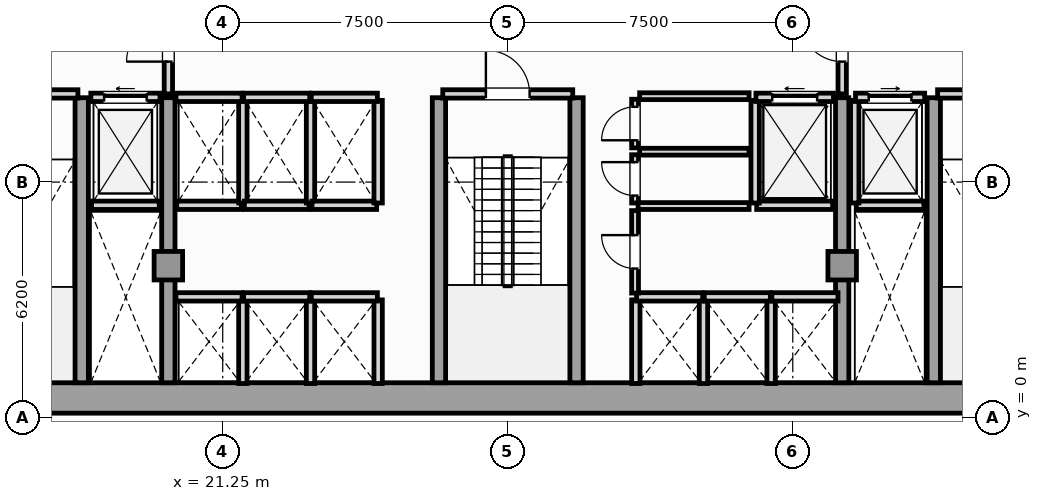
"""IFC4 building model, lengths in metres.
Left out: names, types, materials, properties, quantities, classifications, styles, units other than length and angle.
Written with IfcOpenShell. Run it as: python <this file> out.ifc"""

import sys

from ifc_helpers import new_model, si_unit, direction, frame, frame_2d, origin, origin_2d, place, context, subcontext, project, spatial, rectangle, extrude, element, fill, save


model = new_model("IFC4")
c1 = context("Model", 3, precision=1e-05, world=origin(), true_north=direction((0.0, 1.0)))
c2 = subcontext(c1, "Body", "Model", "MODEL_VIEW")
j1 = project(units=[si_unit("LENGTHUNIT", "METRE"), si_unit("PLANEANGLEUNIT", "RADIAN")], contexts=[c1])
p1 = place(None, origin())
s1 = spatial("IfcSite", under=j1, at=p1, CompositionType="ELEMENT")
p2 = place(p1, origin())
s2 = spatial("IfcBuilding", under=s1, at=p2, CompositionType="ELEMENT")
p3 = place(p2, frame((0.0, 0.0, 15.0)))
s3 = spatial("IfcBuildingStorey", under=s2, at=p3, CompositionType="ELEMENT", Elevation=15.0)
p4 = place(p3, frame((13.25, 0.52, 0.0), z_axis=(0.0, 0.0, 1.0), x_axis=(1.0, 0.0, 0.0)))
e1 = element("IfcWall", 1, at=p4, inside=s3, PredefinedType="SHEAR", context=c2, shape_type="SweptSolid", body=[
    extrude(rectangle(XDim=31.0, YDim=0.8, at=frame_2d((15.5, 0.0))), origin(), (0.0, 0.0, 1.0), 4.5),
])
for number, where, z_axis, x_axis in (
    (2, (17.54, 0.92, 0.0), (0.0, 0.0, 1.0), (0.0, 1.0, 0.0)),
    (3, (19.82, 0.92, 0.0), (0.0, 0.0, 1.0), (0.0, 1.0, 0.0)),
    (4, (26.94, 0.92, 0.0), (0.0, 0.0, 1.0), (0.0, 1.0, 0.0)),
    (5, (30.56, 0.92, 0.0), (0.0, 0.0, 1.0), (0.0, 1.0, 0.0)),
    (6, (37.55, 0.92, 0.0), (0.0, 0.0, 1.0), (0.0, 1.0, 0.0)),
    (7, (39.96, 0.92, 0.0), (0.0, 0.0, 1.0), (0.0, 1.0, 0.0)),
):
    element("IfcWall", number, at=place(p3, frame(where, z_axis=z_axis, x_axis=x_axis)), inside=s3, PredefinedType="SHEAR", context=c2, shape_type="SweptSolid", body=[
        extrude(rectangle(XDim=7.5, YDim=0.35, at=frame_2d((3.75, 0.0))), origin(), (0.0, 0.0, 1.0), 4.5),
    ])
for number, where, z_axis, x_axis in (
    (8, (19.82, 4.0, 0.0), (0.0, 0.0, 1.0), (1.0, 0.0, 0.0)),
    (9, (37.55, 4.0, 0.0), (0.0, 0.0, 1.0), (1.0, 0.0, 0.0)),
):
    element("IfcColumn", number, at=place(p3, frame(where, z_axis=z_axis, x_axis=x_axis)), inside=s3, PredefinedType="COLUMN", context=c2, shape_type="SweptSolid", body=[
        extrude(rectangle(XDim=0.75, YDim=0.75, at=origin_2d()), origin(), (0.0, 0.0, 1.0), 4.8),
    ])
p5 = place(p3, frame((17.8, 5.59, 0.0), z_axis=(0.0, 0.0, 1.0), x_axis=(1.0, 0.0, 0.0)))
e10 = element("IfcWall", 10, at=p5, inside=s3, PredefinedType="SOLIDWALL", context=c2, shape_type="SweptSolid", body=[
    extrude(rectangle(XDim=1.78, YDim=0.22, at=frame_2d((0.89, 0.0))), origin(), (0.0, 0.0, 1.0), 4.5),
])
p6 = place(p3, frame((17.78, 8.43, 0.0), z_axis=(0.0, 0.0, 1.0), x_axis=(1.0, 0.0, 0.0)))
e11 = element("IfcWall", 11, at=p6, inside=s3, PredefinedType="SOLIDWALL", context=c2, shape_type="SweptSolid", body=[
    extrude(rectangle(XDim=1.82, YDim=0.22, at=frame_2d((0.91, 0.0))), origin(), (0.0, 0.0, 1.0), 4.5),
])
p7 = place(p6, frame((0.35, 0.0, 0.0)))
e12 = element("IfcOpeningElement", 12, at=p7, cuts=e11, PredefinedType="OPENING", context=c2, shape_type="SweptSolid", body=[
    extrude(rectangle(XDim=1.12, YDim=2.25, at=frame_2d((0.56, 1.125))), frame((0.0, 0.12, 0.0), z_axis=(0.0, -1.0, 0.0), x_axis=(1.0, 0.0, 0.0)), (0.0, 0.0, 1.0), 0.24),
])
p8 = place(p3, frame((37.92, 5.59, 0.0), z_axis=(0.0, 0.0, 1.0), x_axis=(1.0, 0.0, 0.0)))
e13 = element("IfcWall", 13, at=p8, inside=s3, PredefinedType="SOLIDWALL", context=c2, shape_type="SweptSolid", body=[
    extrude(rectangle(XDim=1.78, YDim=0.22, at=frame_2d((0.89, 0.0))), origin(), (0.0, 0.0, 1.0), 4.5),
])
p9 = place(p3, frame((37.88, 5.65, 0.0), z_axis=(0.0, 0.0, 1.0), x_axis=(0.0, 1.0, 0.0)))
e14 = element("IfcWall", 14, at=p9, inside=s3, PredefinedType="SOLIDWALL", context=c2, shape_type="SweptSolid", body=[
    extrude(rectangle(XDim=2.7, YDim=0.22, at=frame_2d((1.35, 0.0))), origin(), (0.0, 0.0, 1.0), 4.5),
])
p10 = place(p3, frame((37.9, 8.43, 0.0), z_axis=(0.0, 0.0, 1.0), x_axis=(1.0, 0.0, 0.0)))
e15 = element("IfcWall", 15, at=p10, inside=s3, PredefinedType="SOLIDWALL", context=c2, shape_type="SweptSolid", body=[
    extrude(rectangle(XDim=1.82, YDim=0.22, at=frame_2d((0.91, 0.0))), origin(), (0.0, 0.0, 1.0), 4.5),
])
p11 = place(p10, frame((0.35, 0.0, 0.0)))
e16 = element("IfcOpeningElement", 16, at=p11, cuts=e15, PredefinedType="OPENING", context=c2, shape_type="SweptSolid", body=[
    extrude(rectangle(XDim=1.12, YDim=2.25, at=frame_2d((0.56, 1.125))), frame((0.0, 0.12, 0.0), z_axis=(0.0, -1.0, 0.0), x_axis=(1.0, 0.0, 0.0)), (0.0, 0.0, 1.0), 0.24),
])
p12 = place(p3, frame((35.3, 5.59, 0.0), z_axis=(0.0, 0.0, 1.0), x_axis=(1.0, 0.0, 0.0)))
e17 = element("IfcWall", 17, at=p12, inside=s3, PredefinedType="SOLIDWALL", context=c2, shape_type="SweptSolid", body=[
    extrude(rectangle(XDim=2.0, YDim=0.22, at=frame_2d((1.0, 0.0))), origin(), (0.0, 0.0, 1.0), 4.5),
])
p13 = place(p3, frame((35.26, 5.65, 0.0), z_axis=(0.0, 0.0, 1.0), x_axis=(0.0, 1.0, 0.0)))
e18 = element("IfcWall", 18, at=p13, inside=s3, PredefinedType="SOLIDWALL", context=c2, shape_type="SweptSolid", body=[
    extrude(rectangle(XDim=2.7, YDim=0.22, at=frame_2d((1.35, 0.0))), origin(), (0.0, 0.0, 1.0), 4.5),
])
p14 = place(p3, frame((35.28, 8.43, 0.0), z_axis=(0.0, 0.0, 1.0), x_axis=(1.0, 0.0, 0.0)))
e19 = element("IfcWall", 19, at=p14, inside=s3, PredefinedType="SOLIDWALL", context=c2, shape_type="SweptSolid", body=[
    extrude(rectangle(XDim=2.04, YDim=0.22, at=frame_2d((1.02, 0.0))), origin(), (0.0, 0.0, 1.0), 4.5),
])
p15 = place(p14, frame((0.43, 0.0, 0.0)))
e20 = element("IfcOpeningElement", 20, at=p15, cuts=e19, PredefinedType="OPENING", context=c2, shape_type="SweptSolid", body=[
    extrude(rectangle(XDim=1.18, YDim=2.2, at=frame_2d((0.59, 1.1))), frame((0.0, 0.12, 0.0), z_axis=(0.0, -1.0, 0.0), x_axis=(1.0, 0.0, 0.0)), (0.0, 0.0, 1.0), 0.24),
])
p16 = place(p3, frame((21.78, 0.9, 0.0), z_axis=(0.0, 0.0, 1.0), x_axis=(0.0, 1.0, 0.0)))
e21 = element("IfcWall", 21, at=p16, inside=s3, PredefinedType="SOLIDWALL", context=c2, shape_type="SweptSolid", body=[
    extrude(rectangle(XDim=2.2, YDim=0.22, at=frame_2d((1.1, 0.0))), origin(), (0.0, 0.0, 1.0), 4.5),
])
p17 = place(p3, frame((20.02, 3.18, 0.0), z_axis=(0.0, 0.0, 1.0), x_axis=(1.0, 0.0, 0.0)))
e22 = element("IfcWall", 22, at=p17, inside=s3, PredefinedType="SOLIDWALL", context=c2, shape_type="SweptSolid", body=[
    extrude(rectangle(XDim=1.74, YDim=0.22, at=frame_2d((0.87, 0.0))), origin(), (0.0, 0.0, 1.0), 4.5),
])
p18 = place(p3, frame((23.56, 0.9, 0.0), z_axis=(0.0, 0.0, 1.0), x_axis=(0.0, 1.0, 0.0)))
e23 = element("IfcWall", 23, at=p18, inside=s3, PredefinedType="SOLIDWALL", context=c2, shape_type="SweptSolid", body=[
    extrude(rectangle(XDim=2.2, YDim=0.22, at=frame_2d((1.1, 0.0))), origin(), (0.0, 0.0, 1.0), 4.5),
])
p19 = place(p3, frame((21.8, 3.18, 0.0), z_axis=(0.0, 0.0, 1.0), x_axis=(1.0, 0.0, 0.0)))
e24 = element("IfcWall", 24, at=p19, inside=s3, PredefinedType="SOLIDWALL", context=c2, shape_type="SweptSolid", body=[
    extrude(rectangle(XDim=1.74, YDim=0.22, at=frame_2d((0.87, 0.0))), origin(), (0.0, 0.0, 1.0), 4.5),
])
p20 = place(p3, frame((25.34, 0.9, 0.0), z_axis=(0.0, 0.0, 1.0), x_axis=(0.0, 1.0, 0.0)))
e25 = element("IfcWall", 25, at=p20, inside=s3, PredefinedType="SOLIDWALL", context=c2, shape_type="SweptSolid", body=[
    extrude(rectangle(XDim=2.2, YDim=0.22, at=frame_2d((1.1, 0.0))), origin(), (0.0, 0.0, 1.0), 4.5),
])
p21 = place(p3, frame((23.58, 3.18, 0.0), z_axis=(0.0, 0.0, 1.0), x_axis=(1.0, 0.0, 0.0)))
e26 = element("IfcWall", 26, at=p21, inside=s3, PredefinedType="SOLIDWALL", context=c2, shape_type="SweptSolid", body=[
    extrude(rectangle(XDim=1.74, YDim=0.22, at=frame_2d((0.87, 0.0))), origin(), (0.0, 0.0, 1.0), 4.5),
])
for number, where, z_axis, x_axis in (
    (27, (32.12, 0.9, 0.0), (0.0, 0.0, 1.0), (0.0, 1.0, 0.0)),
    (28, (33.9, 0.9, 0.0), (0.0, 0.0, 1.0), (0.0, 1.0, 0.0)),
):
    element("IfcWall", number, at=place(p3, frame(where, z_axis=z_axis, x_axis=x_axis)), inside=s3, PredefinedType="SOLIDWALL", context=c2, shape_type="SweptSolid", body=[
        extrude(rectangle(XDim=2.2, YDim=0.22, at=frame_2d((1.1, 0.0))), origin(), (0.0, 0.0, 1.0), 4.5),
    ])
p22 = place(p3, frame((32.14, 3.18, 0.0), z_axis=(0.0, 0.0, 1.0), x_axis=(1.0, 0.0, 0.0)))
e29 = element("IfcWall", 29, at=p22, inside=s3, PredefinedType="SOLIDWALL", context=c2, shape_type="SweptSolid", body=[
    extrude(rectangle(XDim=1.74, YDim=0.22, at=frame_2d((0.87, 0.0))), origin(), (0.0, 0.0, 1.0), 4.5),
])
p23 = place(p3, frame((35.68, 0.9, 0.0), z_axis=(0.0, 0.0, 1.0), x_axis=(0.0, 1.0, 0.0)))
e30 = element("IfcWall", 30, at=p23, inside=s3, PredefinedType="SOLIDWALL", context=c2, shape_type="SweptSolid", body=[
    extrude(rectangle(XDim=2.2, YDim=0.22, at=frame_2d((1.1, 0.0))), origin(), (0.0, 0.0, 1.0), 4.5),
])
for number, where, z_axis, x_axis in (
    (31, (33.92, 3.18, 0.0), (0.0, 0.0, 1.0), (1.0, 0.0, 0.0)),
    (32, (35.7, 3.18, 0.0), (0.0, 0.0, 1.0), (1.0, 0.0, 0.0)),
):
    element("IfcWall", number, at=place(p3, frame(where, z_axis=z_axis, x_axis=x_axis)), inside=s3, PredefinedType="SOLIDWALL", context=c2, shape_type="SweptSolid", body=[
        extrude(rectangle(XDim=1.74, YDim=0.22, at=frame_2d((0.87, 0.0))), origin(), (0.0, 0.0, 1.0), 4.5),
    ])
p24 = place(p3, frame((20.04, 5.59, 0.0), z_axis=(0.0, 0.0, 1.0), x_axis=(1.0, 0.0, 0.0)))
e33 = element("IfcWall", 33, at=p24, inside=s3, PredefinedType="SOLIDWALL", context=c2, shape_type="SweptSolid", body=[
    extrude(rectangle(XDim=1.7, YDim=0.22, at=frame_2d((0.85, 0.0))), origin(), (0.0, 0.0, 1.0), 4.5),
])
p25 = place(p3, frame((21.78, 5.65, 0.0), z_axis=(0.0, 0.0, 1.0), x_axis=(0.0, 1.0, 0.0)))
e34 = element("IfcWall", 34, at=p25, inside=s3, PredefinedType="SOLIDWALL", context=c2, shape_type="SweptSolid", body=[
    extrude(rectangle(XDim=2.7, YDim=0.22, at=frame_2d((1.35, 0.0))), origin(), (0.0, 0.0, 1.0), 4.5),
])
p26 = place(p3, frame((20.02, 8.43, 0.0), z_axis=(0.0, 0.0, 1.0), x_axis=(1.0, 0.0, 0.0)))
e35 = element("IfcWall", 35, at=p26, inside=s3, PredefinedType="SOLIDWALL", context=c2, shape_type="SweptSolid", body=[
    extrude(rectangle(XDim=1.74, YDim=0.22, at=frame_2d((0.87, 0.0))), origin(), (0.0, 0.0, 1.0), 4.5),
])
p27 = place(p3, frame((21.82, 5.59, 0.0), z_axis=(0.0, 0.0, 1.0), x_axis=(1.0, 0.0, 0.0)))
e36 = element("IfcWall", 36, at=p27, inside=s3, PredefinedType="SOLIDWALL", context=c2, shape_type="SweptSolid", body=[
    extrude(rectangle(XDim=1.7, YDim=0.22, at=frame_2d((0.85, 0.0))), origin(), (0.0, 0.0, 1.0), 4.5),
])
p28 = place(p3, frame((23.56, 5.65, 0.0), z_axis=(0.0, 0.0, 1.0), x_axis=(0.0, 1.0, 0.0)))
e37 = element("IfcWall", 37, at=p28, inside=s3, PredefinedType="SOLIDWALL", context=c2, shape_type="SweptSolid", body=[
    extrude(rectangle(XDim=2.7, YDim=0.22, at=frame_2d((1.35, 0.0))), origin(), (0.0, 0.0, 1.0), 4.5),
])
p29 = place(p3, frame((21.8, 8.43, 0.0), z_axis=(0.0, 0.0, 1.0), x_axis=(1.0, 0.0, 0.0)))
e38 = element("IfcWall", 38, at=p29, inside=s3, PredefinedType="SOLIDWALL", context=c2, shape_type="SweptSolid", body=[
    extrude(rectangle(XDim=1.74, YDim=0.22, at=frame_2d((0.87, 0.0))), origin(), (0.0, 0.0, 1.0), 4.5),
])
p30 = place(p3, frame((23.6, 5.59, 0.0), z_axis=(0.0, 0.0, 1.0), x_axis=(1.0, 0.0, 0.0)))
e39 = element("IfcWall", 39, at=p30, inside=s3, PredefinedType="SOLIDWALL", context=c2, shape_type="SweptSolid", body=[
    extrude(rectangle(XDim=1.7, YDim=0.22, at=frame_2d((0.85, 0.0))), origin(), (0.0, 0.0, 1.0), 4.5),
])
p31 = place(p3, frame((25.34, 5.65, 0.0), z_axis=(0.0, 0.0, 1.0), x_axis=(0.0, 1.0, 0.0)))
e40 = element("IfcWall", 40, at=p31, inside=s3, PredefinedType="SOLIDWALL", context=c2, shape_type="SweptSolid", body=[
    extrude(rectangle(XDim=2.7, YDim=0.22, at=frame_2d((1.35, 0.0))), origin(), (0.0, 0.0, 1.0), 4.5),
])
p32 = place(p3, frame((23.58, 8.43, 0.0), z_axis=(0.0, 0.0, 1.0), x_axis=(1.0, 0.0, 0.0)))
e41 = element("IfcWall", 41, at=p32, inside=s3, PredefinedType="SOLIDWALL", context=c2, shape_type="SweptSolid", body=[
    extrude(rectangle(XDim=1.74, YDim=0.22, at=frame_2d((0.87, 0.0))), origin(), (0.0, 0.0, 1.0), 4.5),
])
p33 = place(p3, frame((14.04, 8.52, 0.0), z_axis=(0.0, 0.0, 1.0), x_axis=(1.0, 0.0, 0.0)))
e42 = element("IfcWall", 42, at=p33, inside=s3, PredefinedType="SOLIDWALL", context=c2, shape_type="SweptSolid", body=[
    extrude(rectangle(XDim=3.4, YDim=0.22, at=frame_2d((1.7, 0.0))), origin(), (0.0, 0.0, 1.0), 4.5),
])
p34 = place(p33, frame((1.125, 0.0, 0.0)))
e43 = element("IfcOpeningElement", 43, at=p34, cuts=e42, PredefinedType="OPENING", context=c2, shape_type="SweptSolid", body=[
    extrude(rectangle(XDim=1.15, YDim=2.2, at=frame_2d((0.575, 1.1))), frame((0.0, 0.12, 0.0), z_axis=(0.0, -1.0, 0.0), x_axis=(1.0, 0.0, 0.0)), (0.0, 0.0, 1.0), 0.24),
])
p35 = place(p3, frame((40.06, 8.52, 0.0), z_axis=(0.0, 0.0, 1.0), x_axis=(1.0, 0.0, 0.0)))
e44 = element("IfcWall", 44, at=p35, inside=s3, PredefinedType="SOLIDWALL", context=c2, shape_type="SweptSolid", body=[
    extrude(rectangle(XDim=3.4, YDim=0.22, at=frame_2d((1.7, 0.0))), origin(), (0.0, 0.0, 1.0), 4.5),
])
p36 = place(p35, frame((1.125, 0.0, 0.0)))
e45 = element("IfcOpeningElement", 45, at=p36, cuts=e44, PredefinedType="OPENING", context=c2, shape_type="SweptSolid", body=[
    extrude(rectangle(XDim=1.15, YDim=2.2, at=frame_2d((0.575, 1.1))), frame((0.0, 0.12, 0.0), z_axis=(0.0, -1.0, 0.0), x_axis=(1.0, 0.0, 0.0)), (0.0, 0.0, 1.0), 0.24),
])
p37 = place(p3, frame((27.04, 8.52, 0.0), z_axis=(0.0, 0.0, 1.0), x_axis=(1.0, 0.0, 0.0)))
e46 = element("IfcWall", 46, at=p37, inside=s3, PredefinedType="SOLIDWALL", context=c2, shape_type="SweptSolid", body=[
    extrude(rectangle(XDim=3.42, YDim=0.22, at=frame_2d((1.71, 0.0))), origin(), (0.0, 0.0, 1.0), 4.5),
])
p38 = place(p37, frame((1.135, 0.0, 0.0)))
e47 = element("IfcOpeningElement", 47, at=p38, cuts=e46, PredefinedType="OPENING", context=c2, shape_type="SweptSolid", body=[
    extrude(rectangle(XDim=1.15, YDim=2.2, at=frame_2d((0.575, 1.1))), frame((0.0, 0.12, 0.0), z_axis=(0.0, -1.0, 0.0), x_axis=(1.0, 0.0, 0.0)), (0.0, 0.0, 1.0), 0.24),
])
p39 = place(p3, frame((19.82, 8.52, 0.0), z_axis=(0.0, 0.0, 1.0), x_axis=(0.0, 1.0, 0.0)))
e48 = element("IfcWall", 48, at=p39, inside=s3, PredefinedType="SOLIDWALL", context=c2, shape_type="SweptSolid", body=[
    extrude(rectangle(XDim=2.8, YDim=0.22, at=frame_2d((1.4, 0.0))), origin(), (0.0, 0.0, 1.0), 3.956),
])
p40 = place(p39, frame((0.85, 0.0, 0.0)))
e49 = element("IfcOpeningElement", 49, at=p40, cuts=e48, PredefinedType="OPENING", context=c2, shape_type="SweptSolid", body=[
    extrude(rectangle(XDim=1.1, YDim=2.2, at=frame_2d((0.55, 1.1))), frame((0.0, 0.12, 0.0), z_axis=(0.0, -1.0, 0.0), x_axis=(1.0, 0.0, 0.0)), (0.0, 0.0, 1.0), 0.24),
])
p41 = place(p3, frame((37.55, 8.52, 0.0), z_axis=(0.0, 0.0, 1.0), x_axis=(0.0, 1.0, 0.0)))
e50 = element("IfcWall", 50, at=p41, inside=s3, PredefinedType="SOLIDWALL", context=c2, shape_type="SweptSolid", body=[
    extrude(rectangle(XDim=2.8, YDim=0.22, at=frame_2d((1.4, 0.0))), origin(), (0.0, 0.0, 1.0), 3.956),
])
p42 = place(p41, frame((0.85, 0.0, 0.0)))
e51 = element("IfcOpeningElement", 51, at=p42, cuts=e50, PredefinedType="OPENING", context=c2, shape_type="SweptSolid", body=[
    extrude(rectangle(XDim=1.1, YDim=2.2, at=frame_2d((0.55, 1.1))), frame((0.0, 0.12, 0.0), z_axis=(0.0, -1.0, 0.0), x_axis=(1.0, 0.0, 0.0)), (0.0, 0.0, 1.0), 0.24),
])
p43 = place(p3, frame((32.1, 5.65, 0.0), z_axis=(0.0, 0.0, 1.0), x_axis=(0.0, 1.0, 0.0)))
e52 = element("IfcWall", 52, at=p43, inside=s3, PredefinedType="PARTITIONING", context=c2, shape_type="SweptSolid", body=[
    extrude(rectangle(XDim=1.27, YDim=0.18, at=frame_2d((0.635, 0.0))), origin(), (0.0, 0.0, 1.0), 4.5),
])
p44 = place(p43, frame((0.195, 0.0, 0.0)))
e53 = element("IfcOpeningElement", 53, at=p44, cuts=e52, PredefinedType="OPENING", context=c2, shape_type="SweptSolid", body=[
    extrude(rectangle(XDim=0.88, YDim=2.05, at=frame_2d((0.44, 1.025))), frame((0.0, 0.1, 0.0), z_axis=(0.0, -1.0, 0.0), x_axis=(1.0, 0.0, 0.0)), (0.0, 0.0, 1.0), 0.2),
])
p45 = place(p3, frame((32.22, 7.0, 0.0), z_axis=(0.0, 0.0, 1.0), x_axis=(1.0, 0.0, 0.0)))
e54 = element("IfcWall", 54, at=p45, inside=s3, PredefinedType="PARTITIONING", context=c2, shape_type="SweptSolid", body=[
    extrude(rectangle(XDim=2.88, YDim=0.18, at=frame_2d((1.44, 0.0))), origin(), (0.0, 0.0, 1.0), 4.5),
])
p46 = place(p3, frame((32.18, 5.57, 0.0), z_axis=(0.0, 0.0, 1.0), x_axis=(1.0, 0.0, 0.0)))
e55 = element("IfcWall", 55, at=p46, inside=s3, PredefinedType="PARTITIONING", context=c2, shape_type="SweptSolid", body=[
    extrude(rectangle(XDim=2.92, YDim=0.18, at=frame_2d((1.46, 0.0))), origin(), (0.0, 0.0, 1.0), 4.5),
])
p47 = place(p3, frame((32.1, 7.1, 0.0), z_axis=(0.0, 0.0, 1.0), x_axis=(0.0, 1.0, 0.0)))
e56 = element("IfcWall", 56, at=p47, inside=s3, PredefinedType="PARTITIONING", context=c2, shape_type="SweptSolid", body=[
    extrude(rectangle(XDim=1.28, YDim=0.18, at=frame_2d((0.64, 0.0))), origin(), (0.0, 0.0, 1.0), 4.5),
])
p48 = place(p47, frame((0.2, 0.0, 0.0)))
e57 = element("IfcOpeningElement", 57, at=p48, cuts=e56, PredefinedType="OPENING", context=c2, shape_type="SweptSolid", body=[
    extrude(rectangle(XDim=0.88, YDim=2.05, at=frame_2d((0.44, 1.025))), frame((0.0, 0.1, 0.0), z_axis=(0.0, -1.0, 0.0), x_axis=(1.0, 0.0, 0.0)), (0.0, 0.0, 1.0), 0.2),
])
p49 = place(p3, frame((32.22, 8.46, 0.0), z_axis=(0.0, 0.0, 1.0), x_axis=(1.0, 0.0, 0.0)))
e58 = element("IfcWall", 58, at=p49, inside=s3, PredefinedType="PARTITIONING", context=c2, shape_type="SweptSolid", body=[
    extrude(rectangle(XDim=2.88, YDim=0.18, at=frame_2d((1.44, 0.0))), origin(), (0.0, 0.0, 1.0), 4.5),
])
p50 = place(p3, frame((32.1, 3.28, 0.0), z_axis=(0.0, 0.0, 1.0), x_axis=(0.0, 1.0, 0.0)))
e59 = element("IfcWall", 59, at=p50, inside=s3, PredefinedType="PARTITIONING", context=c2, shape_type="SweptSolid", body=[
    extrude(rectangle(XDim=2.17, YDim=0.18, at=frame_2d((1.085, 0.0))), origin(), (0.0, 0.0, 1.0), 4.5),
])
p51 = place(p50, frame((0.645, 0.0, 0.0)))
e60 = element("IfcOpeningElement", 60, at=p51, cuts=e59, PredefinedType="OPENING", context=c2, shape_type="SweptSolid", body=[
    extrude(rectangle(XDim=0.88, YDim=2.05, at=frame_2d((0.44, 1.025))), frame((0.0, 0.1, 0.0), z_axis=(0.0, -1.0, 0.0), x_axis=(1.0, 0.0, 0.0)), (0.0, 0.0, 1.0), 0.2),
])
p52 = place(p7, origin())
e61 = element("IfcDoor", 61, at=p52, inside=s3, OperationType="SLIDING_TO_LEFT", PredefinedType="DOOR", context=c2, shape_type="SweptSolid", body=[
    extrude(rectangle(XDim=1.12, YDim=2.25, at=frame_2d((0.56, 1.125))), frame((0.0, 0.025, 0.0), z_axis=(0.0, -1.0, 0.0), x_axis=(1.0, 0.0, 0.0)), (0.0, 0.0, 1.0), 0.05),
])
fill(e12, e61)
p53 = place(p11, origin())
e62 = element("IfcDoor", 62, at=p53, inside=s3, OperationType="SLIDING_TO_RIGHT", PredefinedType="DOOR", context=c2, shape_type="SweptSolid", body=[
    extrude(rectangle(XDim=1.12, YDim=2.25, at=frame_2d((0.56, 1.125))), frame((0.0, 0.025, 0.0), z_axis=(0.0, -1.0, 0.0), x_axis=(1.0, 0.0, 0.0)), (0.0, 0.0, 1.0), 0.05),
])
fill(e16, e62)
p54 = place(p15, origin())
e63 = element("IfcDoor", 63, at=p54, inside=s3, OperationType="SLIDING_TO_LEFT", PredefinedType="DOOR", context=c2, shape_type="SweptSolid", body=[
    extrude(rectangle(XDim=1.18, YDim=2.2, at=frame_2d((0.59, 1.1))), frame((0.0, 0.025, 0.0), z_axis=(0.0, -1.0, 0.0), x_axis=(1.0, 0.0, 0.0)), (0.0, 0.0, 1.0), 0.05),
])
fill(e20, e63)
p55 = place(p38, origin())
e64 = element("IfcDoor", 64, at=p55, inside=s3, OperationType="SINGLE_SWING_LEFT", PredefinedType="DOOR", context=c2, shape_type="SweptSolid", body=[
    extrude(rectangle(XDim=1.15, YDim=2.2, at=frame_2d((0.575, 1.1))), frame((0.0, 0.025, 0.0), z_axis=(0.0, -1.0, 0.0), x_axis=(1.0, 0.0, 0.0)), (0.0, 0.0, 1.0), 0.05),
])
fill(e47, e64)
p56 = place(p40, origin())
e65 = element("IfcDoor", 65, at=p56, inside=s3, OperationType="SINGLE_SWING_LEFT", PredefinedType="DOOR", context=c2, shape_type="SweptSolid", body=[
    extrude(rectangle(XDim=1.1, YDim=2.2, at=frame_2d((0.55, 1.1))), frame((0.0, 0.025, 0.0), z_axis=(0.0, -1.0, 0.0), x_axis=(1.0, 0.0, 0.0)), (0.0, 0.0, 1.0), 0.05),
])
fill(e49, e65)
p57 = place(p42, origin())
e66 = element("IfcDoor", 66, at=p57, inside=s3, OperationType="SINGLE_SWING_RIGHT", PredefinedType="DOOR", context=c2, shape_type="SweptSolid", body=[
    extrude(rectangle(XDim=1.1, YDim=2.2, at=frame_2d((0.55, 1.1))), frame((0.0, 0.025, 0.0), z_axis=(0.0, -1.0, 0.0), x_axis=(1.0, 0.0, 0.0)), (0.0, 0.0, 1.0), 0.05),
])
fill(e51, e66)
p58 = place(p44, origin())
e67 = element("IfcDoor", 67, at=p58, inside=s3, OperationType="SINGLE_SWING_RIGHT", PredefinedType="DOOR", context=c2, shape_type="SweptSolid", body=[
    extrude(rectangle(XDim=0.88, YDim=2.05, at=frame_2d((0.44, 1.025))), frame((0.0, 0.025, 0.0), z_axis=(0.0, -1.0, 0.0), x_axis=(1.0, 0.0, 0.0)), (0.0, 0.0, 1.0), 0.05),
])
fill(e53, e67)
p59 = place(p48, origin())
e68 = element("IfcDoor", 68, at=p59, inside=s3, OperationType="SINGLE_SWING_LEFT", PredefinedType="DOOR", context=c2, shape_type="SweptSolid", body=[
    extrude(rectangle(XDim=0.88, YDim=2.05, at=frame_2d((0.44, 1.025))), frame((0.0, 0.025, 0.0), z_axis=(0.0, -1.0, 0.0), x_axis=(1.0, 0.0, 0.0)), (0.0, 0.0, 1.0), 0.05),
])
fill(e57, e68)
p60 = place(p51, origin())
e69 = element("IfcDoor", 69, at=p60, inside=s3, OperationType="SINGLE_SWING_RIGHT", PredefinedType="DOOR", context=c2, shape_type="SweptSolid", body=[
    extrude(rectangle(XDim=0.88, YDim=2.05, at=frame_2d((0.44, 1.025))), frame((0.0, 0.025, 0.0), z_axis=(0.0, -1.0, 0.0), x_axis=(1.0, 0.0, 0.0)), (0.0, 0.0, 1.0), 0.05),
])
fill(e60, e69)
save(model, sys.argv[1])
